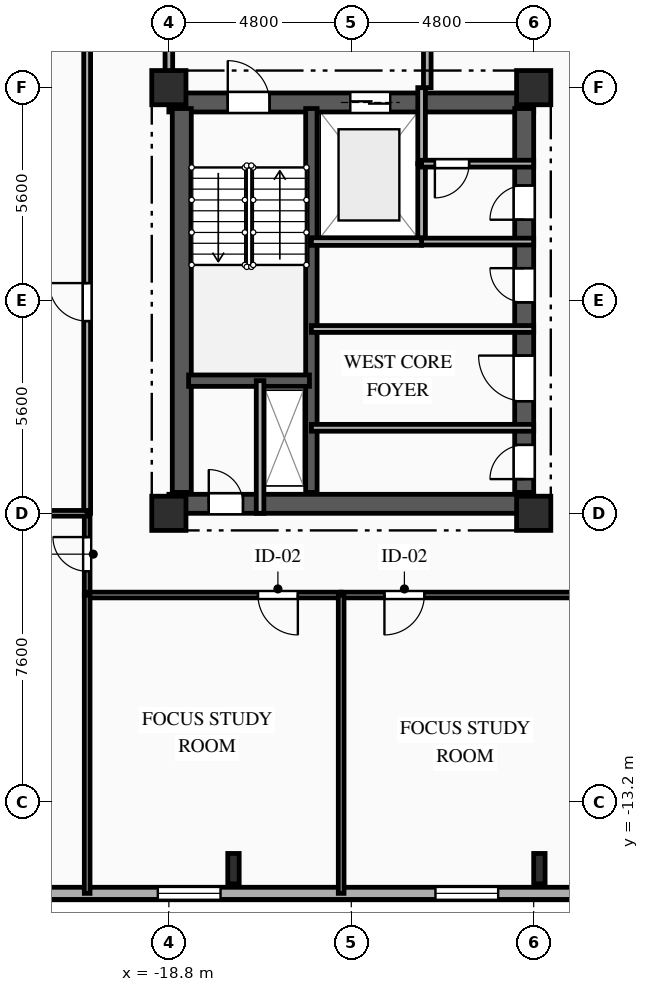
"""IFC4 building model, lengths in metres.
Left out: names, types, materials, properties, quantities, classifications, styles, units other than length and angle.
Written with IfcOpenShell. Run it as: python <this file> out.ifc"""

import sys

from ifc_helpers import new_model, si_unit, direction, frame, frame_2d, origin, origin_2d, place, context, subcontext, project, spatial, rectangle, i_section, extrude, element, fill, save


model = new_model("IFC4")
c1 = context("Model", 3, precision=1e-05, world=origin(), true_north=direction((0.0, 1.0)))
c2 = subcontext(c1, "Body", "Model", "MODEL_VIEW")
j1 = project(units=[si_unit("LENGTHUNIT", "METRE"), si_unit("PLANEANGLEUNIT", "RADIAN")], contexts=[c1])
p1 = place(None, origin())
s1 = spatial("IfcSite", under=j1, at=p1, CompositionType="ELEMENT")
p2 = place(p1, origin())
s2 = spatial("IfcBuilding", under=s1, at=p2, CompositionType="ELEMENT")
p3 = place(p2, frame((0.0, 0.0, 164.5)))
s3 = spatial("IfcBuildingStorey", under=s2, at=p3, CompositionType="ELEMENT", Elevation=164.5)
for number, where, z_axis, x_axis in (
    (1, (-18.8, -5.6, 0.0), (0.0, 0.0, 1.0), (1.0, 0.0, 0.0)),
    (2, (-18.8, 5.6, 0.0), (0.0, 0.0, 1.0), (1.0, 0.0, 0.0)),
    (3, (-9.2, -5.6, 0.0), (0.0, 0.0, 1.0), (1.0, 0.0, 0.0)),
    (4, (-9.2, 5.6, 0.0), (0.0, 0.0, 1.0), (1.0, 0.0, 0.0)),
):
    element("IfcColumn", number, at=place(p3, frame(where, z_axis=z_axis, x_axis=x_axis)), inside=s3, PredefinedType="COLUMN", context=c2, shape_type="SweptSolid", body=[
        extrude(rectangle(XDim=0.9, YDim=0.9, at=origin_2d()), origin(), (0.0, 0.0, 1.0), 3.35),
    ])
for number, where, z_axis, x_axis in (
    (5, (-17.1, -14.95, 0.0), (0.0, 0.0, 1.0), (1.0, 0.0, 0.0)),
    (6, (-9.05, -14.95, 0.0), (0.0, 0.0, 1.0), (1.0, 0.0, 0.0)),
):
    element("IfcColumn", number, at=place(p3, frame(where, z_axis=z_axis, x_axis=x_axis)), inside=s3, PredefinedType="COLUMN", context=c2, shape_type="SweptSolid", body=[
        extrude(i_section(OverallWidth=0.3, OverallDepth=0.8, WebThickness=0.018, FlangeThickness=0.033, FilletRadius=0.03, at=origin_2d()), origin(), (0.0, 0.0, 1.0), 3.35),
    ])
p4 = place(p3, frame((23.8, -15.6, 0.0), z_axis=(0.0, 0.0, 1.0), x_axis=(-1.0, 0.0, 0.0)))
e7 = element("IfcWall", 7, at=p4, inside=s3, PredefinedType="SOLIDWALL", context=c2, shape_type="SweptSolid", body=[
    extrude(rectangle(XDim=49.6, YDim=0.32, at=frame_2d((24.8, 0.0))), origin(), (0.0, 0.0, 1.0), 3.04),
])
p5 = place(p4, frame((1.13, 0.0, 0.85)))
e8 = element("IfcOpeningElement", 8, at=p5, cuts=e7, PredefinedType="OPENING", context=c2, shape_type="SweptSolid", body=[
    extrude(rectangle(XDim=1.1, YDim=1.85, at=frame_2d((0.55, 0.925))), frame((0.0, 0.17, 0.0), z_axis=(0.0, -1.0, 0.0), x_axis=(1.0, 0.0, 0.0)), (0.0, 0.0, 1.0), 0.34),
])
p6 = place(p4, frame((5.695, 0.0, 0.85)))
e9 = element("IfcOpeningElement", 9, at=p6, cuts=e7, PredefinedType="OPENING", context=c2, shape_type="SweptSolid", body=[
    extrude(rectangle(XDim=1.65, YDim=1.85, at=frame_2d((0.825, 0.925))), frame((0.0, 0.17, 0.0), z_axis=(0.0, -1.0, 0.0), x_axis=(1.0, 0.0, 0.0)), (0.0, 0.0, 1.0), 0.34),
])
p7 = place(p4, frame((12.975, 0.0, 0.85)))
e10 = element("IfcOpeningElement", 10, at=p7, cuts=e7, PredefinedType="OPENING", context=c2, shape_type="SweptSolid", body=[
    extrude(rectangle(XDim=1.65, YDim=1.85, at=frame_2d((0.825, 0.925))), frame((0.0, 0.17, 0.0), z_axis=(0.0, -1.0, 0.0), x_axis=(1.0, 0.0, 0.0)), (0.0, 0.0, 1.0), 0.34),
])
p8 = place(p4, frame((21.636, 0.0, 0.85)))
e11 = element("IfcOpeningElement", 11, at=p8, cuts=e7, PredefinedType="OPENING", context=c2, shape_type="SweptSolid", body=[
    extrude(rectangle(XDim=2.2, YDim=1.85, at=frame_2d((1.1, 0.925))), frame((0.0, 0.17, 0.0), z_axis=(0.0, -1.0, 0.0), x_axis=(1.0, 0.0, 0.0)), (0.0, 0.0, 1.0), 0.34),
])
p9 = place(p4, frame((33.935, 0.0, 0.85)))
e12 = element("IfcOpeningElement", 12, at=p9, cuts=e7, PredefinedType="OPENING", context=c2, shape_type="SweptSolid", body=[
    extrude(rectangle(XDim=1.65, YDim=1.85, at=frame_2d((0.825, 0.925))), frame((0.0, 0.17, 0.0), z_axis=(0.0, -1.0, 0.0), x_axis=(1.0, 0.0, 0.0)), (0.0, 0.0, 1.0), 0.34),
])
p10 = place(p4, frame((41.24, 0.0, 0.85)))
e13 = element("IfcOpeningElement", 13, at=p10, cuts=e7, PredefinedType="OPENING", context=c2, shape_type="SweptSolid", body=[
    extrude(rectangle(XDim=1.65, YDim=1.85, at=frame_2d((0.825, 0.925))), frame((0.0, 0.17, 0.0), z_axis=(0.0, -1.0, 0.0), x_axis=(1.0, 0.0, 0.0)), (0.0, 0.0, 1.0), 0.34),
])
p11 = place(p4, frame((46.175, 0.0, 0.85)))
e14 = element("IfcOpeningElement", 14, at=p11, cuts=e7, PredefinedType="OPENING", context=c2, shape_type="SweptSolid", body=[
    extrude(rectangle(XDim=1.65, YDim=1.85, at=frame_2d((0.825, 0.925))), frame((0.0, 0.17, 0.0), z_axis=(0.0, -1.0, 0.0), x_axis=(1.0, 0.0, 0.0)), (0.0, 0.0, 1.0), 0.34),
])
p12 = place(p3, frame((-18.8, 5.21, 0.0), z_axis=(0.0, 0.0, 1.0), x_axis=(1.0, 0.0, 0.0)))
e15 = element("IfcWall", 15, at=p12, inside=s3, PredefinedType="SHEAR", context=c2, shape_type="SweptSolid", body=[
    extrude(rectangle(XDim=9.6, YDim=0.5, at=frame_2d((4.8, 0.0))), origin(), (0.0, 0.0, 1.0), 3.04),
])
p13 = place(p12, frame((1.55, 0.0, 0.0)))
e16 = element("IfcOpeningElement", 16, at=p13, cuts=e15, PredefinedType="OPENING", context=c2, shape_type="SweptSolid", body=[
    extrude(rectangle(XDim=1.1, YDim=2.15, at=frame_2d((0.55, 1.075))), frame((0.0, 0.26, 0.0), z_axis=(0.0, -1.0, 0.0), x_axis=(1.0, 0.0, 0.0)), (0.0, 0.0, 1.0), 0.52),
])
p14 = place(p12, frame((4.775, 0.0, 0.0)))
e17 = element("IfcOpeningElement", 17, at=p14, cuts=e15, PredefinedType="OPENING", context=c2, shape_type="SweptSolid", body=[
    extrude(rectangle(XDim=1.05, YDim=2.1, at=frame_2d((0.525, 1.05))), frame((0.0, 0.26, 0.0), z_axis=(0.0, -1.0, 0.0), x_axis=(1.0, 0.0, 0.0)), (0.0, 0.0, 1.0), 0.52),
])
p15 = place(p3, frame((-18.8, -5.35, 0.0), z_axis=(0.0, 0.0, 1.0), x_axis=(1.0, 0.0, 0.0)))
e18 = element("IfcWall", 18, at=p15, inside=s3, PredefinedType="SHEAR", context=c2, shape_type="SweptSolid", body=[
    extrude(rectangle(XDim=9.6, YDim=0.5, at=frame_2d((4.8, 0.0))), origin(), (0.0, 0.0, 1.0), 3.04),
])
p16 = place(p15, frame((1.05, 0.0, 0.0)))
e19 = element("IfcOpeningElement", 19, at=p16, cuts=e18, PredefinedType="OPENING", context=c2, shape_type="SweptSolid", body=[
    extrude(rectangle(XDim=0.9, YDim=2.1, at=frame_2d((0.45, 1.05))), frame((0.0, 0.26, 0.0), z_axis=(0.0, -1.0, 0.0), x_axis=(1.0, 0.0, 0.0)), (0.0, 0.0, 1.0), 0.52),
])
p17 = place(p3, frame((-18.46, -5.05, 0.0), z_axis=(0.0, 0.0, 1.0), x_axis=(0.0, 1.0, 0.0)))
e20 = element("IfcWall", 20, at=p17, inside=s3, PredefinedType="SHEAR", context=c2, shape_type="SweptSolid", body=[
    extrude(rectangle(XDim=10.1, YDim=0.5, at=frame_2d((5.05, 0.0))), origin(), (0.0, 0.0, 1.0), 3.04),
])
p18 = place(p3, frame((-9.45, -5.05, 0.0), z_axis=(0.0, 0.0, 1.0), x_axis=(0.0, 1.0, 0.0)))
e21 = element("IfcWall", 21, at=p18, inside=s3, PredefinedType="SHEAR", context=c2, shape_type="SweptSolid", body=[
    extrude(rectangle(XDim=10.1, YDim=0.5, at=frame_2d((5.05, 0.0))), origin(), (0.0, 0.0, 1.0), 3.04),
])
p19 = place(p18, frame((7.175, 0.0, 0.0)))
e22 = element("IfcOpeningElement", 22, at=p19, cuts=e21, PredefinedType="OPENING", context=c2, shape_type="SweptSolid", body=[
    extrude(rectangle(XDim=0.9, YDim=2.1, at=frame_2d((0.45, 1.05))), frame((0.0, 0.26, 0.0), z_axis=(0.0, -1.0, 0.0), x_axis=(1.0, 0.0, 0.0)), (0.0, 0.0, 1.0), 0.52),
])
p20 = place(p18, frame((2.4, 0.0, 0.0)))
e23 = element("IfcOpeningElement", 23, at=p20, cuts=e21, PredefinedType="OPENING", context=c2, shape_type="SweptSolid", body=[
    extrude(rectangle(XDim=1.2, YDim=2.15, at=frame_2d((0.6, 1.075))), frame((0.0, 0.26, 0.0), z_axis=(0.0, -1.0, 0.0), x_axis=(1.0, 0.0, 0.0)), (0.0, 0.0, 1.0), 0.52),
])
p21 = place(p18, frame((0.35, 0.0, 0.0)))
e24 = element("IfcOpeningElement", 24, at=p21, cuts=e21, PredefinedType="OPENING", context=c2, shape_type="SweptSolid", body=[
    extrude(rectangle(XDim=0.9, YDim=2.1, at=frame_2d((0.45, 1.05))), frame((0.0, 0.26, 0.0), z_axis=(0.0, -1.0, 0.0), x_axis=(1.0, 0.0, 0.0)), (0.0, 0.0, 1.0), 0.52),
])
p22 = place(p18, frame((5.0, 0.0, 0.0)))
e25 = element("IfcOpeningElement", 25, at=p22, cuts=e21, PredefinedType="OPENING", context=c2, shape_type="SweptSolid", body=[
    extrude(rectangle(XDim=0.9, YDim=2.1, at=frame_2d((0.45, 1.05))), frame((0.0, 0.26, 0.0), z_axis=(0.0, -1.0, 0.0), x_axis=(1.0, 0.0, 0.0)), (0.0, 0.0, 1.0), 0.52),
])
p23 = place(p3, frame((-15.05, -5.05, 0.0), z_axis=(0.0, 0.0, 1.0), x_axis=(0.0, 1.0, 0.0)))
e26 = element("IfcWall", 26, at=p23, inside=s3, PredefinedType="SHEAR", context=c2, shape_type="SweptSolid", body=[
    extrude(rectangle(XDim=10.1, YDim=0.3, at=frame_2d((5.05, 0.0))), origin(), (0.0, 0.0, 1.0), 3.04),
])
p24 = place(p3, frame((-18.28, -2.11, 0.0), z_axis=(0.0, 0.0, 1.0), x_axis=(1.0, 0.0, 0.0)))
e27 = element("IfcWall", 27, at=p24, inside=s3, PredefinedType="SHEAR", context=c2, shape_type="SweptSolid", body=[
    extrude(rectangle(XDim=3.18, YDim=0.3, at=frame_2d((1.59, 0.0))), origin(), (0.0, 0.0, 1.0), 3.04),
])
p25 = place(p3, frame((-16.4, -5.6, 0.0), z_axis=(0.0, 0.0, 1.0), x_axis=(0.0, 1.0, 0.0)))
e28 = element("IfcWall", 28, at=p25, inside=s3, PredefinedType="PARTITIONING", context=c2, shape_type="SweptSolid", body=[
    extrude(rectangle(XDim=3.49, YDim=0.2, at=frame_2d((1.745, 0.0))), origin(), (0.0, 0.0, 1.0), 3.04),
])
p26 = place(p3, frame((-12.15, 1.55, 0.0), z_axis=(0.0, 0.0, 1.0), x_axis=(0.0, 1.0, 0.0)))
e29 = element("IfcWall", 29, at=p26, inside=s3, PredefinedType="PARTITIONING", context=c2, shape_type="SweptSolid", body=[
    extrude(rectangle(XDim=2.05, YDim=0.2, at=frame_2d((1.025, 0.0))), origin(), (0.0, 0.0, 1.0), 3.04),
])
p27 = place(p3, frame((-12.15, 3.6, 0.0), z_axis=(0.0, 0.0, 1.0), x_axis=(0.0, 1.0, 0.0)))
e30 = element("IfcWall", 30, at=p27, inside=s3, PredefinedType="PARTITIONING", context=c2, shape_type="SweptSolid", body=[
    extrude(rectangle(XDim=2.0, YDim=0.2, at=frame_2d((1.0, 0.0))), origin(), (0.0, 0.0, 1.0), 3.04),
])
p28 = place(p3, frame((-18.8, 8.5, 0.0), z_axis=(0.0, 0.0, 1.0), x_axis=(0.0, -1.0, 0.0)))
e31 = element("IfcWall", 31, at=p28, inside=s3, PredefinedType="PARTITIONING", context=c2, shape_type="SweptSolid", body=[
    extrude(rectangle(XDim=2.9, YDim=0.2, at=frame_2d((1.45, 0.0))), origin(), (0.0, 0.0, 1.0), 2.525),
])
p29 = place(p3, frame((-12.0, 5.6, 0.0), z_axis=(0.0, 0.0, 1.0), x_axis=(0.0, 1.0, 0.0)))
e32 = element("IfcWall", 32, at=p29, inside=s3, PredefinedType="PARTITIONING", context=c2, shape_type="SweptSolid", body=[
    extrude(rectangle(XDim=2.9, YDim=0.2, at=frame_2d((1.45, 0.0))), origin(), (0.0, 0.0, 1.0), 3.04),
])
p30 = place(p3, frame((-9.2, 3.6, 0.0), z_axis=(0.0, 0.0, 1.0), x_axis=(-1.0, 0.0, 0.0)))
e33 = element("IfcWall", 33, at=p30, inside=s3, PredefinedType="PARTITIONING", context=c2, shape_type="SweptSolid", body=[
    extrude(rectangle(XDim=2.95, YDim=0.18, at=frame_2d((1.475, 0.0))), origin(), (0.0, 0.0, 1.0), 3.04),
])
p31 = place(p30, frame((1.7, 0.0, 0.0)))
e34 = element("IfcOpeningElement", 34, at=p31, cuts=e33, PredefinedType="OPENING", context=c2, shape_type="SweptSolid", body=[
    extrude(rectangle(XDim=0.9, YDim=2.1, at=frame_2d((0.45, 1.05))), frame((0.0, 0.1, 0.0), z_axis=(0.0, -1.0, 0.0), x_axis=(1.0, 0.0, 0.0)), (0.0, 0.0, 1.0), 0.2),
])
p32 = place(p3, frame((-12.15, 1.55, 0.0), z_axis=(0.0, 0.0, 1.0), x_axis=(1.0, 0.0, 0.0)))
e35 = element("IfcWall", 35, at=p32, inside=s3, PredefinedType="PARTITIONING", context=c2, shape_type="SweptSolid", body=[
    extrude(rectangle(XDim=2.95, YDim=0.18, at=frame_2d((1.475, 0.0))), origin(), (0.0, 0.0, 1.0), 3.04),
])
p33 = place(p3, frame((-15.05, -3.35, 0.0), z_axis=(0.0, 0.0, 1.0), x_axis=(1.0, 0.0, 0.0)))
e36 = element("IfcWall", 36, at=p33, inside=s3, PredefinedType="PARTITIONING", context=c2, shape_type="SweptSolid", body=[
    extrude(rectangle(XDim=5.85, YDim=0.18, at=frame_2d((2.925, 0.0))), origin(), (0.0, 0.0, 1.0), 2.755),
])
p34 = place(p3, frame((-9.2, -0.75, 0.0), z_axis=(0.0, 0.0, 1.0), x_axis=(-1.0, 0.0, 0.0)))
e37 = element("IfcWall", 37, at=p34, inside=s3, PredefinedType="PARTITIONING", context=c2, shape_type="SweptSolid", body=[
    extrude(rectangle(XDim=5.85, YDim=0.18, at=frame_2d((2.925, 0.0))), origin(), (0.0, 0.0, 1.0), 3.04),
])
p35 = place(p3, frame((-20.95, -7.75, 0.0), z_axis=(0.0, 0.0, 1.0), x_axis=(0.0, 1.0, 0.0)))
e38 = element("IfcWall", 38, at=p35, inside=s3, PredefinedType="PARTITIONING", context=c2, shape_type="SweptSolid", body=[
    extrude(rectangle(XDim=2.15, YDim=0.15, at=frame_2d((1.075, 0.0))), origin(), (0.0, 0.0, 1.0), 3.04),
])
p36 = place(p35, frame((0.625, 0.0, 0.0)))
e39 = element("IfcOpeningElement", 39, at=p36, cuts=e38, PredefinedType="OPENING", context=c2, shape_type="SweptSolid", body=[
    extrude(rectangle(XDim=0.9, YDim=2.1, at=frame_2d((0.45, 1.05))), frame((0.0, 0.085, 0.0), z_axis=(0.0, -1.0, 0.0), x_axis=(1.0, 0.0, 0.0)), (0.0, 0.0, 1.0), 0.17),
])
p37 = place(p3, frame((-14.267, -7.75, 0.0), z_axis=(0.0, 0.0, 1.0), x_axis=(-1.0, 0.0, 0.0)))
e40 = element("IfcWall", 40, at=p37, inside=s3, PredefinedType="PARTITIONING", context=c2, shape_type="SweptSolid", body=[
    extrude(rectangle(XDim=6.683, YDim=0.15, at=frame_2d((3.342, 0.0))), origin(), (0.0, 0.0, 1.0), 3.04),
])
p38 = place(p37, frame((1.139, 0.0, 0.0)))
e41 = element("IfcOpeningElement", 41, at=p38, cuts=e40, PredefinedType="OPENING", context=c2, shape_type="SweptSolid", body=[
    extrude(rectangle(XDim=1.05, YDim=2.15, at=frame_2d((0.525, 1.075))), frame((0.0, 0.085, 0.0), z_axis=(0.0, -1.0, 0.0), x_axis=(1.0, 0.0, 0.0)), (0.0, 0.0, 1.0), 0.17),
])
p39 = place(p3, frame((-7.583, -7.75, 0.0), z_axis=(0.0, 0.0, 1.0), x_axis=(-1.0, 0.0, 0.0)))
e42 = element("IfcWall", 42, at=p39, inside=s3, PredefinedType="PARTITIONING", context=c2, shape_type="SweptSolid", body=[
    extrude(rectangle(XDim=6.684, YDim=0.15, at=frame_2d((3.342, 0.0))), origin(), (0.0, 0.0, 1.0), 3.04),
])
p40 = place(p39, frame((4.494, 0.0, 0.0)))
e43 = element("IfcOpeningElement", 43, at=p40, cuts=e42, PredefinedType="OPENING", context=c2, shape_type="SweptSolid", body=[
    extrude(rectangle(XDim=1.05, YDim=2.15, at=frame_2d((0.525, 1.075))), frame((0.0, 0.085, 0.0), z_axis=(0.0, -1.0, 0.0), x_axis=(1.0, 0.0, 0.0)), (0.0, 0.0, 1.0), 0.17),
])
p41 = place(p3, frame((-20.95, -5.6, 0.0), z_axis=(0.0, 0.0, 1.0), x_axis=(0.0, 1.0, 0.0)))
e44 = element("IfcWall", 44, at=p41, inside=s3, PredefinedType="PARTITIONING", context=c2, shape_type="SweptSolid", body=[
    extrude(rectangle(XDim=14.1, YDim=0.18, at=frame_2d((7.05, 0.0))), origin(), (0.0, 0.0, 1.0), 3.04),
])
p42 = place(p41, frame((5.058, 0.0, 0.0)))
e45 = element("IfcOpeningElement", 45, at=p42, cuts=e44, PredefinedType="OPENING", context=c2, shape_type="SweptSolid", body=[
    extrude(rectangle(XDim=1.0, YDim=2.15, at=frame_2d((0.5, 1.075))), frame((0.0, 0.1, 0.0), z_axis=(0.0, -1.0, 0.0), x_axis=(1.0, 0.0, 0.0)), (0.0, 0.0, 1.0), 0.2),
])
p43 = place(p3, frame((-20.95, -5.6, 0.0), z_axis=(0.0, 0.0, 1.0), x_axis=(-1.0, 0.0, 0.0)))
e46 = element("IfcWall", 46, at=p43, inside=s3, PredefinedType="PARTITIONING", context=c2, shape_type="SweptSolid", body=[
    extrude(rectangle(XDim=2.65, YDim=0.15, at=frame_2d((1.325, 0.0))), origin(), (0.0, 0.0, 1.0), 3.04),
])
p44 = place(p43, frame((0.965, 0.0, 0.0)))
e47 = element("IfcOpeningElement", 47, at=p44, cuts=e46, PredefinedType="OPENING", context=c2, shape_type="SweptSolid", body=[
    extrude(rectangle(XDim=1.05, YDim=2.15, at=frame_2d((0.525, 1.075))), frame((0.0, 0.085, 0.0), z_axis=(0.0, -1.0, 0.0), x_axis=(1.0, 0.0, 0.0)), (0.0, 0.0, 1.0), 0.17),
])
for number, where, z_axis, x_axis in (
    (48, (-20.95, -7.75, 0.0), (0.0, 0.0, 1.0), (0.0, -1.0, 0.0)),
    (49, (-14.267, -7.75, 0.0), (0.0, 0.0, 1.0), (0.0, -1.0, 0.0)),
):
    element("IfcWall", number, at=place(p3, frame(where, z_axis=z_axis, x_axis=x_axis)), inside=s3, PredefinedType="PARTITIONING", context=c2, shape_type="SweptSolid", body=[
        extrude(rectangle(XDim=7.85, YDim=0.15, at=frame_2d((3.925, 0.0))), origin(), (0.0, 0.0, 1.0), 3.04),
    ])
p45 = place(p3, frame((-15.05, 1.55, 0.0), z_axis=(0.0, 0.0, 1.0), x_axis=(1.0, 0.0, 0.0)))
e50 = element("IfcWall", 50, at=p45, inside=s3, PredefinedType="PARTITIONING", context=c2, shape_type="SweptSolid", body=[
    extrude(rectangle(XDim=2.9, YDim=0.2, at=frame_2d((1.45, 0.0))), origin(), (0.0, 0.0, 1.0), 3.04),
])
p46 = place(p9, origin())
e51 = element("IfcWindow", 51, at=p46, inside=s3, PartitioningType="SINGLE_PANEL", PredefinedType="WINDOW", context=c2, shape_type="SweptSolid", body=[
    extrude(rectangle(XDim=1.65, YDim=1.85, at=frame_2d((0.825, 0.925))), frame((0.0, 0.03, 0.0), z_axis=(0.0, -1.0, 0.0), x_axis=(1.0, 0.0, 0.0)), (0.0, 0.0, 1.0), 0.06),
])
fill(e12, e51)
p47 = place(p10, origin())
e52 = element("IfcWindow", 52, at=p47, inside=s3, PartitioningType="SINGLE_PANEL", PredefinedType="WINDOW", context=c2, shape_type="SweptSolid", body=[
    extrude(rectangle(XDim=1.65, YDim=1.85, at=frame_2d((0.825, 0.925))), frame((0.0, 0.03, 0.0), z_axis=(0.0, -1.0, 0.0), x_axis=(1.0, 0.0, 0.0)), (0.0, 0.0, 1.0), 0.06),
])
fill(e13, e52)
p48 = place(p13, origin())
e53 = element("IfcDoor", 53, at=p48, inside=s3, OperationType="SINGLE_SWING_LEFT", PredefinedType="DOOR", context=c2, shape_type="SweptSolid", body=[
    extrude(rectangle(XDim=1.1, YDim=2.15, at=frame_2d((0.55, 1.075))), frame((0.0, 0.025, 0.0), z_axis=(0.0, -1.0, 0.0), x_axis=(1.0, 0.0, 0.0)), (0.0, 0.0, 1.0), 0.05),
])
fill(e16, e53)
p49 = place(p14, origin())
e54 = element("IfcDoor", 54, at=p49, inside=s3, OperationType="DOUBLE_DOOR_SLIDING", PredefinedType="DOOR", context=c2, shape_type="SweptSolid", body=[
    extrude(rectangle(XDim=1.05, YDim=2.1, at=frame_2d((0.525, 1.05))), frame((0.0, 0.025, 0.0), z_axis=(0.0, -1.0, 0.0), x_axis=(1.0, 0.0, 0.0)), (0.0, 0.0, 1.0), 0.05),
])
fill(e17, e54)
p50 = place(p16, origin())
e55 = element("IfcDoor", 55, at=p50, inside=s3, OperationType="SINGLE_SWING_LEFT", PredefinedType="DOOR", context=c2, shape_type="SweptSolid", body=[
    extrude(rectangle(XDim=0.9, YDim=2.1, at=frame_2d((0.45, 1.05))), frame((0.0, 0.025, 0.0), z_axis=(0.0, -1.0, 0.0), x_axis=(1.0, 0.0, 0.0)), (0.0, 0.0, 1.0), 0.05),
])
fill(e19, e55)
p51 = place(p31, origin())
e56 = element("IfcDoor", 56, at=p51, inside=s3, OperationType="SINGLE_SWING_RIGHT", PredefinedType="DOOR", context=c2, shape_type="SweptSolid", body=[
    extrude(rectangle(XDim=0.9, YDim=2.1, at=frame_2d((0.45, 1.05))), frame((0.0, 0.025, 0.0), z_axis=(0.0, -1.0, 0.0), x_axis=(1.0, 0.0, 0.0)), (0.0, 0.0, 1.0), 0.05),
])
fill(e34, e56)
p52 = place(p19, origin())
e57 = element("IfcDoor", 57, at=p52, inside=s3, OperationType="SINGLE_SWING_LEFT", PredefinedType="DOOR", context=c2, shape_type="SweptSolid", body=[
    extrude(rectangle(XDim=0.9, YDim=2.1, at=frame_2d((0.45, 1.05))), frame((0.0, 0.025, 0.0), z_axis=(0.0, -1.0, 0.0), x_axis=(1.0, 0.0, 0.0)), (0.0, 0.0, 1.0), 0.05),
])
fill(e22, e57)
p53 = place(p20, origin())
e58 = element("IfcDoor", 58, at=p53, inside=s3, OperationType="SINGLE_SWING_RIGHT", PredefinedType="DOOR", context=c2, shape_type="SweptSolid", body=[
    extrude(rectangle(XDim=1.2, YDim=2.15, at=frame_2d((0.6, 1.075))), frame((0.0, 0.025, 0.0), z_axis=(0.0, -1.0, 0.0), x_axis=(1.0, 0.0, 0.0)), (0.0, 0.0, 1.0), 0.05),
])
fill(e23, e58)
p54 = place(p21, origin())
e59 = element("IfcDoor", 59, at=p54, inside=s3, OperationType="SINGLE_SWING_LEFT", PredefinedType="DOOR", context=c2, shape_type="SweptSolid", body=[
    extrude(rectangle(XDim=0.9, YDim=2.1, at=frame_2d((0.45, 1.05))), frame((0.0, 0.025, 0.0), z_axis=(0.0, -1.0, 0.0), x_axis=(1.0, 0.0, 0.0)), (0.0, 0.0, 1.0), 0.05),
])
fill(e24, e59)
p55 = place(p22, origin())
e60 = element("IfcDoor", 60, at=p55, inside=s3, OperationType="SINGLE_SWING_RIGHT", PredefinedType="DOOR", context=c2, shape_type="SweptSolid", body=[
    extrude(rectangle(XDim=0.9, YDim=2.1, at=frame_2d((0.45, 1.05))), frame((0.0, 0.025, 0.0), z_axis=(0.0, -1.0, 0.0), x_axis=(1.0, 0.0, 0.0)), (0.0, 0.0, 1.0), 0.05),
])
fill(e25, e60)
p56 = place(p36, origin())
e61 = element("IfcDoor", 61, at=p56, inside=s3, OperationType="SINGLE_SWING_RIGHT", PredefinedType="DOOR", context=c2, shape_type="SweptSolid", body=[
    extrude(rectangle(XDim=0.9, YDim=2.1, at=frame_2d((0.45, 1.05))), frame((0.0, 0.025, 0.0), z_axis=(0.0, -1.0, 0.0), x_axis=(1.0, 0.0, 0.0)), (0.0, 0.0, 1.0), 0.05),
])
fill(e39, e61)
p57 = place(p38, origin())
e62 = element("IfcDoor", 62, at=p57, inside=s3, OperationType="SINGLE_SWING_LEFT", PredefinedType="DOOR", context=c2, shape_type="SweptSolid", body=[
    extrude(rectangle(XDim=1.05, YDim=2.15, at=frame_2d((0.525, 1.075))), frame((0.0, 0.025, 0.0), z_axis=(0.0, -1.0, 0.0), x_axis=(1.0, 0.0, 0.0)), (0.0, 0.0, 1.0), 0.05),
])
fill(e41, e62)
p58 = place(p40, origin())
e63 = element("IfcDoor", 63, at=p58, inside=s3, OperationType="SINGLE_SWING_RIGHT", PredefinedType="DOOR", context=c2, shape_type="SweptSolid", body=[
    extrude(rectangle(XDim=1.05, YDim=2.15, at=frame_2d((0.525, 1.075))), frame((0.0, 0.025, 0.0), z_axis=(0.0, -1.0, 0.0), x_axis=(1.0, 0.0, 0.0)), (0.0, 0.0, 1.0), 0.05),
])
fill(e43, e63)
p59 = place(p42, origin())
e64 = element("IfcDoor", 64, at=p59, inside=s3, OperationType="SINGLE_SWING_RIGHT", PredefinedType="DOOR", context=c2, shape_type="SweptSolid", body=[
    extrude(rectangle(XDim=1.0, YDim=2.15, at=frame_2d((0.5, 1.075))), frame((0.0, 0.025, 0.0), z_axis=(0.0, -1.0, 0.0), x_axis=(1.0, 0.0, 0.0)), (0.0, 0.0, 1.0), 0.05),
])
fill(e45, e64)
save(model, sys.argv[1])
